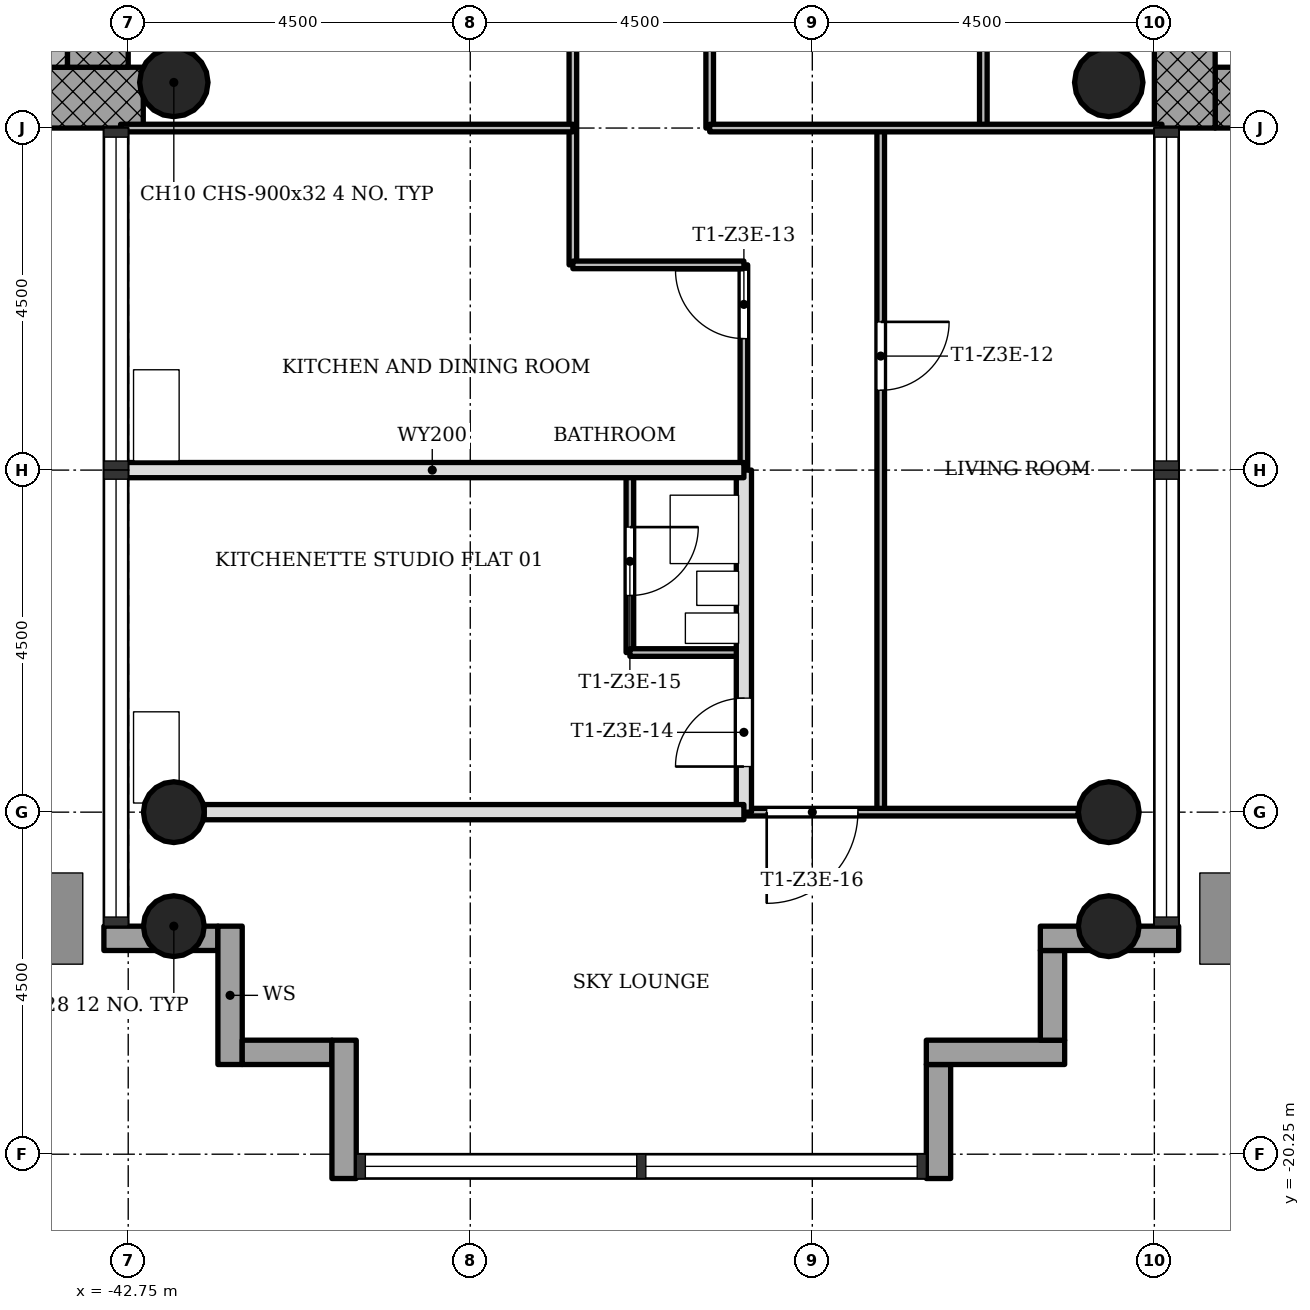
"""IFC4 building model, lengths in metres.
Left out: names, types, materials, properties, quantities, classifications, styles, units other than length and angle.
Written with IfcOpenShell. Run it as: python <this file> out.ifc"""

import sys

from ifc_helpers import new_model, si_unit, direction, frame, frame_2d, origin, origin_2d, place, context, subcontext, project, spatial, rectangle, hollow_circle, extrude, element, fill, save


model = new_model("IFC4")
c1 = context("Model", 3, precision=1e-05, world=origin(), true_north=direction((0.0, 1.0)))
c2 = subcontext(c1, "Body", "Model", "MODEL_VIEW")
j1 = project(units=[si_unit("LENGTHUNIT", "METRE"), si_unit("PLANEANGLEUNIT", "RADIAN")], contexts=[c1])
p1 = place(None, origin())
s1 = spatial("IfcSite", under=j1, at=p1, CompositionType="ELEMENT")
p2 = place(p1, origin())
s2 = spatial("IfcBuilding", under=s1, at=p2, CompositionType="ELEMENT")
p3 = place(p2, frame((0.0, 0.0, 177.9)))
s3 = spatial("IfcBuildingStorey", under=s2, at=p3, CompositionType="ELEMENT", Elevation=177.9)
p4 = place(p3, frame((-28.45, -6.35, 0.0), z_axis=(0.0, 0.0, 1.0), x_axis=(1.0, 0.0, 0.0)))
e1 = element("IfcWall", 1, at=p4, inside=s3, PredefinedType="SHEAR", context=c2, shape_type="SweptSolid", body=[
    extrude(rectangle(XDim=8.2, YDim=0.8, at=frame_2d((4.1, 0.0))), origin(), (0.0, 0.0, 1.0), 3.4),
])
p5 = place(p3, frame((-28.85, 5.95, 0.0), z_axis=(0.0, 0.0, 1.0), x_axis=(0.0, -1.0, 0.0)))
e2 = element("IfcWall", 2, at=p5, inside=s3, PredefinedType="SHEAR", context=c2, shape_type="SweptSolid", body=[
    extrude(rectangle(XDim=12.7, YDim=0.8, at=frame_2d((6.35, 0.0))), origin(), (0.0, 0.0, 1.0), 3.4),
])
p6 = place(p5, frame((5.05, 0.0, 0.0)))
e3 = element("IfcOpeningElement", 3, at=p6, cuts=e2, PredefinedType="OPENING", context=c2, shape_type="SweptSolid", body=[
    extrude(rectangle(XDim=1.8, YDim=2.1, at=frame_2d((0.9, 1.05))), frame((0.0, 0.41, 0.0), z_axis=(0.0, -1.0, 0.0), x_axis=(1.0, 0.0, 0.0)), (0.0, 0.0, 1.0), 0.82),
])
p7 = place(p3, frame((-50.95, -6.35, 0.0), z_axis=(0.0, 0.0, 1.0), x_axis=(1.0, 0.0, 0.0)))
e4 = element("IfcWall", 4, at=p7, inside=s3, PredefinedType="SHEAR", context=c2, shape_type="SweptSolid", body=[
    extrude(rectangle(XDim=8.398, YDim=0.8, at=frame_2d((4.199, 0.0))), origin(), (0.0, 0.0, 1.0), 3.4),
])
p8 = place(p3, frame((-43.15, -5.95, 0.0), z_axis=(0.0, 0.0, 1.0), x_axis=(0.0, 1.0, 0.0)))
e5 = element("IfcWall", 5, at=p8, inside=s3, PredefinedType="SHEAR", context=c2, shape_type="SweptSolid", body=[
    extrude(rectangle(XDim=12.7, YDim=0.8, at=frame_2d((6.35, 0.0))), origin(), (0.0, 0.0, 1.0), 3.4),
])
p9 = place(p8, frame((5.05, 0.0, 0.0)))
e6 = element("IfcOpeningElement", 6, at=p9, cuts=e5, PredefinedType="OPENING", context=c2, shape_type="SweptSolid", body=[
    extrude(rectangle(XDim=1.8, YDim=2.1, at=frame_2d((0.9, 1.05))), frame((0.0, 0.41, 0.0), z_axis=(0.0, -1.0, 0.0), x_axis=(1.0, 0.0, 0.0)), (0.0, 0.0, 1.0), 0.82),
])
for number, where, z_axis, x_axis in (
    (7, (-42.15, -15.75, 0.0), (0.0, 0.0, 1.0), (1.0, 0.0, 0.0)),
    (8, (-29.85, -15.75, 0.0), (0.0, 0.0, 1.0), (1.0, 0.0, 0.0)),
    (9, (-42.15, -17.25, 0.0), (0.0, 0.0, 1.0), (1.0, 0.0, 0.0)),
    (10, (-29.85, -17.25, 0.0), (0.0, 0.0, 1.0), (1.0, 0.0, 0.0)),
):
    element("IfcColumn", number, at=place(p3, frame(where, z_axis=z_axis, x_axis=x_axis)), inside=s3, PredefinedType="COLUMN", context=c2, shape_type="SweptSolid", body=[
        extrude(hollow_circle(Radius=0.4, WallThickness=0.028, at=origin_2d()), origin(), (0.0, 0.0, 1.0), 3.4),
    ])
for number, where, z_axis, x_axis in (
    (11, (-42.15, -6.15, 0.0), (0.0, 0.0, 1.0), (1.0, 0.0, 0.0)),
    (12, (-29.85, -6.15, 0.0), (0.0, 0.0, 1.0), (1.0, 0.0, 0.0)),
):
    element("IfcColumn", number, at=place(p3, frame(where, z_axis=z_axis, x_axis=x_axis)), inside=s3, PredefinedType="COLUMN", context=c2, shape_type="SweptSolid", body=[
        extrude(hollow_circle(Radius=0.45, WallThickness=0.032, at=origin_2d()), origin(), (0.0, 0.0, 1.0), 3.4),
    ])
p10 = place(p3, frame((-43.07, -17.41, -0.3), z_axis=(0.0, 0.0, 1.0), x_axis=(1.0, 0.0, 0.0)))
e13 = element("IfcWall", 13, at=p10, inside=s3, PredefinedType="STANDARD", context=c2, shape_type="SweptSolid", body=[
    extrude(rectangle(XDim=1.5, YDim=0.32, at=frame_2d((0.75, 0.0))), origin(), (0.0, 0.0, 1.0), 3.4),
])
p11 = place(p3, frame((-41.41, -17.25, -0.3), z_axis=(0.0, 0.0, 1.0), x_axis=(0.0, -1.0, 0.0)))
e14 = element("IfcWall", 14, at=p11, inside=s3, PredefinedType="STANDARD", context=c2, shape_type="SweptSolid", body=[
    extrude(rectangle(XDim=1.82, YDim=0.32, at=frame_2d((0.91, 0.0))), origin(), (0.0, 0.0, 1.0), 3.4),
])
p12 = place(p3, frame((-41.25, -18.91, -0.3), z_axis=(0.0, 0.0, 1.0), x_axis=(1.0, 0.0, 0.0)))
e15 = element("IfcWall", 15, at=p12, inside=s3, PredefinedType="STANDARD", context=c2, shape_type="SweptSolid", body=[
    extrude(rectangle(XDim=1.18, YDim=0.32, at=frame_2d((0.59, 0.0))), origin(), (0.0, 0.0, 1.0), 3.4),
])
p13 = place(p3, frame((-39.91, -18.75, -0.3), z_axis=(0.0, 0.0, 1.0), x_axis=(0.0, -1.0, 0.0)))
e16 = element("IfcWall", 16, at=p13, inside=s3, PredefinedType="STANDARD", context=c2, shape_type="SweptSolid", body=[
    extrude(rectangle(XDim=1.82, YDim=0.32, at=frame_2d((0.91, 0.0))), origin(), (0.0, 0.0, 1.0), 3.4),
])
p14 = place(p3, frame((-32.09, -20.57, -0.3), z_axis=(0.0, 0.0, 1.0), x_axis=(0.0, 1.0, 0.0)))
e17 = element("IfcWall", 17, at=p14, inside=s3, PredefinedType="STANDARD", context=c2, shape_type="SweptSolid", body=[
    extrude(rectangle(XDim=1.5, YDim=0.32, at=frame_2d((0.75, 0.0))), origin(), (0.0, 0.0, 1.0), 3.4),
])
p15 = place(p3, frame((-32.25, -18.91, -0.3), z_axis=(0.0, 0.0, 1.0), x_axis=(1.0, 0.0, 0.0)))
e18 = element("IfcWall", 18, at=p15, inside=s3, PredefinedType="STANDARD", context=c2, shape_type="SweptSolid", body=[
    extrude(rectangle(XDim=1.82, YDim=0.32, at=frame_2d((0.91, 0.0))), origin(), (0.0, 0.0, 1.0), 3.4),
])
p16 = place(p3, frame((-30.59, -18.75, -0.3), z_axis=(0.0, 0.0, 1.0), x_axis=(0.0, 1.0, 0.0)))
e19 = element("IfcWall", 19, at=p16, inside=s3, PredefinedType="STANDARD", context=c2, shape_type="SweptSolid", body=[
    extrude(rectangle(XDim=1.18, YDim=0.32, at=frame_2d((0.59, 0.0))), origin(), (0.0, 0.0, 1.0), 3.4),
])
p17 = place(p3, frame((-30.75, -17.41, -0.3), z_axis=(0.0, 0.0, 1.0), x_axis=(1.0, 0.0, 0.0)))
e20 = element("IfcWall", 20, at=p17, inside=s3, PredefinedType="STANDARD", context=c2, shape_type="SweptSolid", body=[
    extrude(rectangle(XDim=1.82, YDim=0.32, at=frame_2d((0.91, 0.0))), origin(), (0.0, 0.0, 1.0), 3.4),
])
p18 = place(p3, frame((-36.9, -8.55, 0.0), z_axis=(0.0, 0.0, 1.0), x_axis=(0.0, 1.0, 0.0)))
e21 = element("IfcWall", 21, at=p18, inside=s3, PredefinedType="PARTITIONING", context=c2, shape_type="SweptSolid", body=[
    extrude(rectangle(XDim=4.05, YDim=0.1, at=frame_2d((2.025, 0.0))), origin(), (0.0, 0.0, 1.0), 3.0),
])
p19 = place(p3, frame((-36.15, -13.65, 0.0), z_axis=(0.0, 0.0, 1.0), x_axis=(0.0, 1.0, 0.0)))
e22 = element("IfcWall", 22, at=p19, inside=s3, PredefinedType="PARTITIONING", context=c2, shape_type="SweptSolid", body=[
    extrude(rectangle(XDim=2.4, YDim=0.1, at=frame_2d((1.2, 0.0))), origin(), (0.0, 0.0, 1.0), 3.0),
])
p20 = place(p19, frame((0.75, 0.0, 0.0)))
e23 = element("IfcOpeningElement", 23, at=p20, cuts=e22, PredefinedType="OPENING", context=c2, shape_type="SweptSolid", body=[
    extrude(rectangle(XDim=0.9, YDim=2.1, at=frame_2d((0.45, 1.05))), frame((0.0, 0.06, 0.0), z_axis=(0.0, -1.0, 0.0), x_axis=(1.0, 0.0, 0.0)), (0.0, 0.0, 1.0), 0.12),
])
p21 = place(p3, frame((-35.1, -6.75, 0.0), z_axis=(0.0, 0.0, 1.0), x_axis=(0.0, 1.0, 0.0)))
e24 = element("IfcWall", 24, at=p21, inside=s3, PredefinedType="PARTITIONING", context=c2, shape_type="SweptSolid", body=[
    extrude(rectangle(XDim=2.25, YDim=0.1, at=frame_2d((1.125, 0.0))), origin(), (0.0, 0.0, 1.0), 3.0),
])
p22 = place(p3, frame((-34.65, -11.25, 0.0), z_axis=(0.0, 0.0, 1.0), x_axis=(0.0, 1.0, 0.0)))
e25 = element("IfcWall", 25, at=p22, inside=s3, PredefinedType="PARTITIONING", context=c2, shape_type="SweptSolid", body=[
    extrude(rectangle(XDim=2.7, YDim=0.1, at=frame_2d((1.35, 0.0))), origin(), (0.0, 0.0, 1.0), 3.0),
])
p23 = place(p22, frame((1.73, 0.0, 0.0)))
e26 = element("IfcOpeningElement", 26, at=p23, cuts=e25, PredefinedType="OPENING", context=c2, shape_type="SweptSolid", body=[
    extrude(rectangle(XDim=0.9, YDim=2.1, at=frame_2d((0.45, 1.05))), frame((0.0, 0.06, 0.0), z_axis=(0.0, -1.0, 0.0), x_axis=(1.0, 0.0, 0.0)), (0.0, 0.0, 1.0), 0.12),
])
p24 = place(p3, frame((-34.65, -15.75, 0.0), z_axis=(0.0, 0.0, 1.0), x_axis=(0.0, 1.0, 0.0)))
e27 = element("IfcWall", 27, at=p24, inside=s3, PredefinedType="SOLIDWALL", context=c2, shape_type="SweptSolid", body=[
    extrude(rectangle(XDim=4.5, YDim=0.2, at=frame_2d((2.25, 0.0))), origin(), (0.0, 0.0, 1.0), 3.0),
])
p25 = place(p24, frame((0.6, 0.0, 0.0)))
e28 = element("IfcOpeningElement", 28, at=p25, cuts=e27, PredefinedType="OPENING", context=c2, shape_type="SweptSolid", body=[
    extrude(rectangle(XDim=0.9, YDim=2.1, at=frame_2d((0.45, 1.05))), frame((0.0, 0.11, 0.0), z_axis=(0.0, -1.0, 0.0), x_axis=(1.0, 0.0, 0.0)), (0.0, 0.0, 1.0), 0.22),
])
p26 = place(p3, frame((-32.85, -15.75, 0.0), z_axis=(0.0, 0.0, 1.0), x_axis=(0.0, 1.0, 0.0)))
e29 = element("IfcWall", 29, at=p26, inside=s3, PredefinedType="PARTITIONING", context=c2, shape_type="SweptSolid", body=[
    extrude(rectangle(XDim=9.0, YDim=0.1, at=frame_2d((4.5, 0.0))), origin(), (0.0, 0.0, 1.0), 3.0),
])
p27 = place(p26, frame((5.55, 0.0, 0.0)))
e30 = element("IfcOpeningElement", 30, at=p27, cuts=e29, PredefinedType="OPENING", context=c2, shape_type="SweptSolid", body=[
    extrude(rectangle(XDim=0.9, YDim=2.1, at=frame_2d((0.45, 1.05))), frame((0.0, 0.06, 0.0), z_axis=(0.0, -1.0, 0.0), x_axis=(1.0, 0.0, 0.0)), (0.0, 0.0, 1.0), 0.12),
])
p28 = place(p3, frame((-31.5, -6.75, 0.0), z_axis=(0.0, 0.0, 1.0), x_axis=(0.0, 1.0, 0.0)))
e31 = element("IfcWall", 31, at=p28, inside=s3, PredefinedType="PARTITIONING", context=c2, shape_type="SweptSolid", body=[
    extrude(rectangle(XDim=5.25, YDim=0.1, at=frame_2d((2.625, 0.0))), origin(), (0.0, 0.0, 1.0), 3.0),
])
p29 = place(p28, frame((3.3, 0.0, 0.0)))
e32 = element("IfcOpeningElement", 32, at=p29, cuts=e31, PredefinedType="OPENING", context=c2, shape_type="SweptSolid", body=[
    extrude(rectangle(XDim=0.9, YDim=2.1, at=frame_2d((0.45, 1.05))), frame((0.0, 0.06, 0.0), z_axis=(0.0, -1.0, 0.0), x_axis=(1.0, 0.0, 0.0)), (0.0, 0.0, 1.0), 0.12),
])
p30 = place(p3, frame((-34.65, -15.75, 0.0), z_axis=(0.0, 0.0, 1.0), x_axis=(1.0, 0.0, 0.0)))
e33 = element("IfcWall", 33, at=p30, inside=s3, PredefinedType="PARTITIONING", context=c2, shape_type="SweptSolid", body=[
    extrude(rectangle(XDim=4.4, YDim=0.1, at=frame_2d((2.2, 0.0))), origin(), (0.0, 0.0, 1.0), 3.0),
])
p31 = place(p30, frame((0.3, 0.0, 0.0)))
e34 = element("IfcOpeningElement", 34, at=p31, cuts=e33, PredefinedType="OPENING", context=c2, shape_type="SweptSolid", body=[
    extrude(rectangle(XDim=1.2, YDim=2.1, at=frame_2d((0.6, 1.05))), frame((0.0, 0.06, 0.0), z_axis=(0.0, -1.0, 0.0), x_axis=(1.0, 0.0, 0.0)), (0.0, 0.0, 1.0), 0.12),
])
p32 = place(p3, frame((-41.75, -15.75, 0.0), z_axis=(0.0, 0.0, 1.0), x_axis=(1.0, 0.0, 0.0)))
e35 = element("IfcWall", 35, at=p32, inside=s3, PredefinedType="SOLIDWALL", context=c2, shape_type="SweptSolid", body=[
    extrude(rectangle(XDim=7.1, YDim=0.2, at=frame_2d((3.55, 0.0))), origin(), (0.0, 0.0, 1.0), 3.0),
])
p33 = place(p3, frame((-36.15, -13.65, 0.0), z_axis=(0.0, 0.0, 1.0), x_axis=(1.0, 0.0, 0.0)))
e36 = element("IfcWall", 36, at=p33, inside=s3, PredefinedType="PARTITIONING", context=c2, shape_type="SweptSolid", body=[
    extrude(rectangle(XDim=1.5, YDim=0.1, at=frame_2d((0.75, 0.0))), origin(), (0.0, 0.0, 1.0), 3.0),
])
p34 = place(p3, frame((-42.85, -11.25, 0.0), z_axis=(0.0, 0.0, 1.0), x_axis=(1.0, 0.0, 0.0)))
e37 = element("IfcWall", 37, at=p34, inside=s3, PredefinedType="SOLIDWALL", context=c2, shape_type="SweptSolid", body=[
    extrude(rectangle(XDim=8.2, YDim=0.2, at=frame_2d((4.1, 0.0))), origin(), (0.0, 0.0, 1.0), 3.0),
])
p35 = place(p3, frame((-36.9, -8.55, 0.0), z_axis=(0.0, 0.0, 1.0), x_axis=(1.0, 0.0, 0.0)))
e38 = element("IfcWall", 38, at=p35, inside=s3, PredefinedType="PARTITIONING", context=c2, shape_type="SweptSolid", body=[
    extrude(rectangle(XDim=2.25, YDim=0.1, at=frame_2d((1.125, 0.0))), origin(), (0.0, 0.0, 1.0), 3.0),
])
for number, where, z_axis, x_axis in (
    (39, (-42.85, -6.75, 0.0), (0.0, 0.0, 1.0), (1.0, 0.0, 0.0)),
    (40, (-35.1, -6.75, 0.0), (0.0, 0.0, 1.0), (1.0, 0.0, 0.0)),
):
    element("IfcWall", number, at=place(p3, frame(where, z_axis=z_axis, x_axis=x_axis)), inside=s3, PredefinedType="PARTITIONING", context=c2, shape_type="SweptSolid", body=[
        extrude(rectangle(XDim=5.95, YDim=0.1, at=frame_2d((2.975, 0.0))), origin(), (0.0, 0.0, 1.0), 3.0),
    ])
p36 = place(p3, frame((-43.75, -1.85, 0.0), z_axis=(0.0, 0.0, 1.0), x_axis=(0.0, -1.0, 0.0)))
e41 = element("IfcWall", 41, at=p36, inside=s3, PredefinedType="SHEAR", context=c2, shape_type="SweptSolid", body=[
    extrude(rectangle(XDim=4.1, YDim=0.4, at=frame_2d((2.05, 0.0))), origin(), (0.0, 0.0, 1.0), 3.4),
])
p37 = place(p27, origin())
e42 = element("IfcDoor", 42, at=p37, inside=s3, OperationType="SINGLE_SWING_RIGHT", PredefinedType="DOOR", context=c2, shape_type="SweptSolid", body=[
    extrude(rectangle(XDim=0.9, YDim=2.1, at=frame_2d((0.45, 1.05))), frame((0.0, 0.025, 0.0), z_axis=(0.0, -1.0, 0.0), x_axis=(1.0, 0.0, 0.0)), (0.0, 0.0, 1.0), 0.05),
])
fill(e30, e42)
p38 = place(p23, origin())
e43 = element("IfcDoor", 43, at=p38, inside=s3, OperationType="SINGLE_SWING_LEFT", PredefinedType="DOOR", context=c2, shape_type="SweptSolid", body=[
    extrude(rectangle(XDim=0.9, YDim=2.1, at=frame_2d((0.45, 1.05))), frame((0.0, 0.025, 0.0), z_axis=(0.0, -1.0, 0.0), x_axis=(1.0, 0.0, 0.0)), (0.0, 0.0, 1.0), 0.05),
])
fill(e26, e43)
p39 = place(p25, origin())
e44 = element("IfcDoor", 44, at=p39, inside=s3, OperationType="SINGLE_SWING_RIGHT", PredefinedType="DOOR", context=c2, shape_type="SweptSolid", body=[
    extrude(rectangle(XDim=0.9, YDim=2.1, at=frame_2d((0.45, 1.05))), frame((0.0, 0.025, 0.0), z_axis=(0.0, -1.0, 0.0), x_axis=(1.0, 0.0, 0.0)), (0.0, 0.0, 1.0), 0.05),
])
fill(e28, e44)
p40 = place(p20, origin())
e45 = element("IfcDoor", 45, at=p40, inside=s3, OperationType="SINGLE_SWING_RIGHT", PredefinedType="DOOR", context=c2, shape_type="SweptSolid", body=[
    extrude(rectangle(XDim=0.9, YDim=2.1, at=frame_2d((0.45, 1.05))), frame((0.0, 0.025, 0.0), z_axis=(0.0, -1.0, 0.0), x_axis=(1.0, 0.0, 0.0)), (0.0, 0.0, 1.0), 0.05),
])
fill(e23, e45)
p41 = place(p31, origin())
e46 = element("IfcDoor", 46, at=p41, inside=s3, OperationType="SINGLE_SWING_LEFT", PredefinedType="DOOR", context=c2, shape_type="SweptSolid", body=[
    extrude(rectangle(XDim=1.2, YDim=2.1, at=frame_2d((0.6, 1.05))), frame((0.0, 0.025, 0.0), z_axis=(0.0, -1.0, 0.0), x_axis=(1.0, 0.0, 0.0)), (0.0, 0.0, 1.0), 0.05),
])
fill(e34, e46)
save(model, sys.argv[1])
